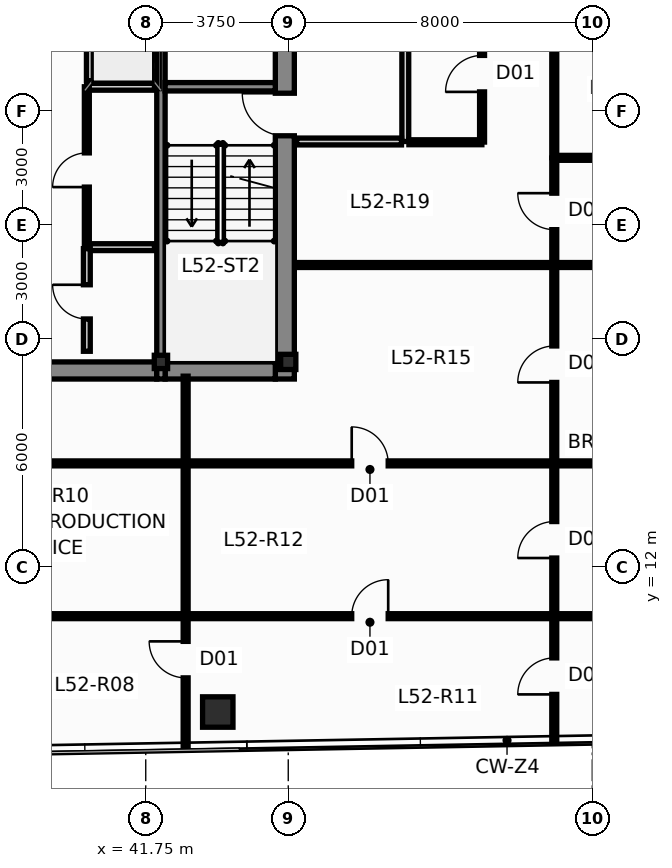
"""IFC4 building model, lengths in metres.
Left out: names, types, materials, properties, quantities, classifications, styles, units other than length and angle.
Written with IfcOpenShell. Run it as: python <this file> out.ifc"""

import sys

from ifc_helpers import new_model, si_unit, direction, frame, frame_2d, origin, origin_2d, place, context, subcontext, project, spatial, rectangle, hollow_rectangle, i_section, extrude, source, transform, mapped, element, fill, save


model = new_model("IFC4")
c1 = context("Model", 3, precision=1e-05, world=origin(), true_north=direction((0.0, 1.0)))
c2 = subcontext(c1, "Body", "Model", "MODEL_VIEW")
j1 = project(units=[si_unit("LENGTHUNIT", "METRE"), si_unit("PLANEANGLEUNIT", "RADIAN")], contexts=[c1])
p1 = place(None, origin())
s1 = spatial("IfcSite", under=j1, at=p1, CompositionType="ELEMENT")
p2 = place(p1, origin())
s2 = spatial("IfcBuilding", under=s1, at=p2, CompositionType="ELEMENT")
p3 = place(p2, frame((0.0, 0.0, 198.65)))
s3 = spatial("IfcBuildingStorey", under=s2, at=p3, CompositionType="ELEMENT", Elevation=198.65)
m1 = source(origin(), c2, "Body", "SweptSolid", [
    extrude(i_section(OverallWidth=0.4, OverallDepth=0.4, WebThickness=0.02, FlangeThickness=0.032, at=origin_2d()), origin(), (0.0, 0.0, 1.0), 3.65),
])
p4 = place(p3, frame((45.5, 17.4, 0.0), z_axis=(0.0, 0.0, 1.0), x_axis=(1.0, 0.0, 0.0)))
e1 = element("IfcColumn", 1, at=p4, inside=s3, PredefinedType="COLUMN", context=c2, shape_type="MappedRepresentation", body=[
    mapped(m1, transform((0.0, 0.0, 0.0), scale=1.0)),
])
m2 = source(origin(), c2, "Body", "SweptSolid", [
    extrude(hollow_rectangle(XDim=0.35, YDim=0.35, WallThickness=0.016, at=origin_2d()), origin(), (0.0, 0.0, 1.0), 3.65),
])
p5 = place(p3, frame((42.15, 17.4, 0.0), z_axis=(0.0, 0.0, 1.0), x_axis=(1.0, 0.0, 0.0)))
e2 = element("IfcColumn", 2, at=p5, inside=s3, PredefinedType="COLUMN", context=c2, shape_type="MappedRepresentation", body=[
    mapped(m2, transform((0.0, 0.0, 0.0), scale=1.0)),
])
p6 = place(p3, frame((45.41, 16.95, 0.0), z_axis=(0.0, 0.0, 1.0), x_axis=(0.0, 1.0, 0.0)))
e3 = element("IfcWall", 3, at=p6, inside=s3, PredefinedType="SHEAR", context=c2, shape_type="SweptSolid", body=[
    extrude(rectangle(XDim=13.275, YDim=0.5, at=frame_2d((6.638, 0.0))), origin(), (0.0, 0.0, 1.0), 3.65),
])
p7 = place(p6, frame((6.4, 0.0, 0.0)))
e4 = element("IfcOpeningElement", 4, at=p7, cuts=e3, PredefinedType="OPENING", context=c2, shape_type="SweptSolid", body=[
    extrude(rectangle(XDim=1.12, YDim=2.15, at=frame_2d((0.56, 1.075))), frame((0.0, 0.262, 0.0), z_axis=(0.0, -1.0, 0.0), x_axis=(1.0, 0.0, 0.0)), (0.0, 0.0, 1.0), 0.524),
])
p8 = place(p6, frame((10.85, 0.0, 0.0)))
e5 = element("IfcOpeningElement", 5, at=p8, cuts=e3, PredefinedType="OPENING", context=c2, shape_type="SweptSolid", body=[
    extrude(rectangle(XDim=1.2, YDim=2.2, at=frame_2d((0.6, 1.1))), frame((0.0, 0.262, 0.0), z_axis=(0.0, -1.0, 0.0), x_axis=(1.0, 0.0, 0.0)), (0.0, 0.0, 1.0), 0.524),
])
p9 = place(p3, frame((33.96, 17.175, 0.0), z_axis=(0.0, 0.0, 1.0), x_axis=(1.0, 0.0, 0.0)))
e6 = element("IfcWall", 6, at=p9, inside=s3, PredefinedType="SHEAR", context=c2, shape_type="SweptSolid", body=[
    extrude(rectangle(XDim=8.08, YDim=0.45, at=frame_2d((4.04, 0.0))), origin(), (0.0, 0.0, 1.0), 3.65),
])
p10 = place(p3, frame((42.26, 17.175, 0.0), z_axis=(0.0, 0.0, 1.0), x_axis=(1.0, 0.0, 0.0)))
e7 = element("IfcWall", 7, at=p10, inside=s3, PredefinedType="SHEAR", context=c2, shape_type="SweptSolid", body=[
    extrude(rectangle(XDim=2.9, YDim=0.45, at=frame_2d((1.45, 0.0))), origin(), (0.0, 0.0, 1.0), 3.65),
])
p11 = place(p3, frame((42.15, 16.95, 0.0), z_axis=(0.0, 0.0, 1.0), x_axis=(0.0, 1.0, 0.0)))
e8 = element("IfcWall", 8, at=p11, inside=s3, PredefinedType="SHEAR", context=c2, shape_type="SweptSolid", body=[
    extrude(rectangle(XDim=13.275, YDim=0.22, at=frame_2d((6.638, 0.0))), origin(), (0.0, 0.0, 1.0), 3.65),
])
p12 = place(p3, frame((42.26, 24.64, 0.0), z_axis=(0.0, 0.0, 1.0), x_axis=(1.0, 0.0, 0.0)))
e9 = element("IfcWall", 9, at=p12, inside=s3, PredefinedType="SHEAR", context=c2, shape_type="SweptSolid", body=[
    extrude(rectangle(XDim=2.9, YDim=0.22, at=frame_2d((1.45, 0.0))), origin(), (0.0, 0.0, 1.0), 3.65),
])
m3 = source(origin(), c2, "Body", "SweptSolid", [
    extrude(hollow_rectangle(XDim=0.8, YDim=0.8, WallThickness=0.045, at=origin_2d()), origin(), (0.0, 0.0, 1.0), 3.651),
])
p13 = place(p3, frame((43.646, 8.188, 0.0), z_axis=(0.004413512568, 0.019793935152, 0.999794339371), x_axis=(-0.976031638482, 0.217628676148, 0.0)))
e10 = element("IfcColumn", 10, at=p13, inside=s3, PredefinedType="COLUMN", context=c2, shape_type="MappedRepresentation", body=[
    mapped(m3, transform((0.0, 0.0, 0.0), scale=1.0)),
])
p14 = place(p3, frame((40.28, 24.8, 0.0), z_axis=(0.0, 0.0, 1.0), x_axis=(0.0, 1.0, 0.0)))
e11 = element("IfcWall", 11, at=p14, inside=s3, PredefinedType="PARTITIONING", context=c2, shape_type="SweptSolid", body=[
    extrude(rectangle(XDim=2.0, YDim=0.18, at=frame_2d((1.0, 0.0))), origin(), (0.0, 0.0, 1.0), 3.4),
])
p15 = place(p3, frame((40.2, 24.64, 0.0), z_axis=(0.0, 0.0, 1.0), x_axis=(1.0, 0.0, 0.0)))
e12 = element("IfcWall", 12, at=p15, inside=s3, PredefinedType="PARTITIONING", context=c2, shape_type="SweptSolid", body=[
    extrude(rectangle(XDim=1.78, YDim=0.18, at=frame_2d((0.89, 0.0))), origin(), (0.0, 0.0, 1.0), 3.4),
])
p16 = place(p3, frame((48.58, 23.2, 0.0), z_axis=(0.0, 0.0, 1.0), x_axis=(0.0, 1.0, 0.0)))
e13 = element("IfcWall", 13, at=p16, inside=s3, PredefinedType="PARTITIONING", context=c2, shape_type="SweptSolid", body=[
    extrude(rectangle(XDim=6.4, YDim=0.18, at=frame_2d((3.2, 0.0))), origin(), (0.0, 0.0, 1.0), 3.078),
])
p17 = place(p16, frame((2.65, 0.0, 0.0)))
e14 = element("IfcOpeningElement", 14, at=p17, cuts=e13, PredefinedType="OPENING", context=c2, shape_type="SweptSolid", body=[
    extrude(rectangle(XDim=1.05, YDim=2.15, at=frame_2d((0.525, 1.075))), frame((0.0, 0.102, 0.0), z_axis=(0.0, -1.0, 0.0), x_axis=(1.0, 0.0, 0.0)), (0.0, 0.0, 1.0), 0.204),
])
p18 = place(p3, frame((45.72, 23.2, 0.0), z_axis=(0.0, 0.0, 1.0), x_axis=(1.0, 0.0, 0.0)))
e15 = element("IfcWall", 15, at=p18, inside=s3, PredefinedType="PARTITIONING", context=c2, shape_type="SweptSolid", body=[
    extrude(rectangle(XDim=2.76, YDim=0.18, at=frame_2d((1.38, 0.0))), origin(), (0.0, 0.0, 1.0), 3.4),
])
p19 = place(p3, frame((40.22, 20.42, 0.0), z_axis=(0.0, 0.0, 1.0), x_axis=(1.0, 0.0, 0.0)))
e16 = element("IfcWall", 16, at=p19, inside=s3, PredefinedType="PARTITIONING", context=c2, shape_type="SweptSolid", body=[
    extrude(rectangle(XDim=1.76, YDim=0.18, at=frame_2d((0.88, 0.0))), origin(), (0.0, 0.0, 1.0), 3.4),
])
p20 = place(p3, frame((40.2, 20.5, 0.0), z_axis=(0.0, 0.0, 1.0), x_axis=(0.0, 1.0, 0.0)))
e17 = element("IfcWall", 17, at=p20, inside=s3, PredefinedType="PARTITIONING", context=c2, shape_type="SweptSolid", body=[
    extrude(rectangle(XDim=4.14, YDim=0.13, at=frame_2d((2.07, 0.0))), origin(), (0.0, 0.0, 1.0), 3.4),
])
p21 = place(p20, frame((1.5, 0.0, 0.0)))
e18 = element("IfcOpeningElement", 18, at=p21, cuts=e17, PredefinedType="OPENING", context=c2, shape_type="SweptSolid", body=[
    extrude(rectangle(XDim=0.9, YDim=2.1, at=frame_2d((0.45, 1.05))), frame((0.0, 0.077, 0.0), z_axis=(0.0, -1.0, 0.0), x_axis=(1.0, 0.0, 0.0)), (0.0, 0.0, 1.0), 0.154),
])
p22 = place(p3, frame((40.2, 17.68, 0.0), z_axis=(0.0, 0.0, 1.0), x_axis=(0.0, 1.0, 0.0)))
e19 = element("IfcWall", 19, at=p22, inside=s3, PredefinedType="PARTITIONING", context=c2, shape_type="SweptSolid", body=[
    extrude(rectangle(XDim=2.7, YDim=0.18, at=frame_2d((1.35, 0.0))), origin(), (0.0, 0.0, 1.0), 3.4),
])
p23 = place(p22, frame((0.85, 0.0, 0.0)))
e20 = element("IfcOpeningElement", 20, at=p23, cuts=e19, PredefinedType="OPENING", context=c2, shape_type="SweptSolid", body=[
    extrude(rectangle(XDim=0.9, YDim=2.1, at=frame_2d((0.45, 1.05))), frame((0.0, 0.102, 0.0), z_axis=(0.0, -1.0, 0.0), x_axis=(1.0, 0.0, 0.0)), (0.0, 0.0, 1.0), 0.204),
])
p24 = place(p3, frame((52.505, 14.73, 0.0), z_axis=(0.0, 0.0, 1.0), x_axis=(1.0, 0.0, 0.0)))
e21 = element("IfcWall", 21, at=p24, inside=s3, PredefinedType="PARTITIONING", context=c2, shape_type="SweptSolid", body=[
    extrude(rectangle(XDim=9.759, YDim=0.13, at=frame_2d((4.879, 0.0))), origin(), (0.0, 0.0, 1.0), 3.4),
])
p25 = place(p3, frame((42.805, 10.71, 0.0), z_axis=(0.0, 0.0, 1.0), x_axis=(1.0, 0.0, 0.0)))
e22 = element("IfcWall", 22, at=p25, inside=s3, PredefinedType="PARTITIONING", context=c2, shape_type="SweptSolid", body=[
    extrude(rectangle(XDim=9.69, YDim=0.13, at=frame_2d((4.845, 0.0))), origin(), (0.0, 0.0, 1.0), 3.4),
])
p26 = place(p25, frame((4.365, 0.0, 0.0)))
e23 = element("IfcOpeningElement", 23, at=p26, cuts=e22, PredefinedType="OPENING", context=c2, shape_type="SweptSolid", body=[
    extrude(rectangle(XDim=0.96, YDim=2.15, at=frame_2d((0.48, 1.075))), frame((0.0, 0.077, 0.0), z_axis=(0.0, -1.0, 0.0), x_axis=(1.0, 0.0, 0.0)), (0.0, 0.0, 1.0), 0.154),
])
p27 = place(p3, frame((42.805, 14.73, 0.0), z_axis=(0.0, 0.0, 1.0), x_axis=(1.0, 0.0, 0.0)))
e24 = element("IfcWall", 24, at=p27, inside=s3, PredefinedType="PARTITIONING", context=c2, shape_type="SweptSolid", body=[
    extrude(rectangle(XDim=9.69, YDim=0.13, at=frame_2d((4.845, 0.0))), origin(), (0.0, 0.0, 1.0), 3.078),
])
p28 = place(p27, frame((4.365, 0.0, 0.0)))
e25 = element("IfcOpeningElement", 25, at=p28, cuts=e24, PredefinedType="OPENING", context=c2, shape_type="SweptSolid", body=[
    extrude(rectangle(XDim=0.96, YDim=2.15, at=frame_2d((0.48, 1.075))), frame((0.0, 0.077, 0.0), z_axis=(0.0, -1.0, 0.0), x_axis=(1.0, 0.0, 0.0)), (0.0, 0.0, 1.0), 0.154),
])
p29 = place(p3, frame((33.205, 10.71, 0.0), z_axis=(0.0, 0.0, 1.0), x_axis=(1.0, 0.0, 0.0)))
e26 = element("IfcWall", 26, at=p29, inside=s3, PredefinedType="PARTITIONING", context=c2, shape_type="SweptSolid", body=[
    extrude(rectangle(XDim=9.59, YDim=0.13, at=frame_2d((4.795, 0.0))), origin(), (0.0, 0.0, 1.0), 3.4),
])
p30 = place(p29, frame((4.315, 0.0, 0.0)))
e27 = element("IfcOpeningElement", 27, at=p30, cuts=e26, PredefinedType="OPENING", context=c2, shape_type="SweptSolid", body=[
    extrude(rectangle(XDim=0.96, YDim=2.15, at=frame_2d((0.48, 1.075))), frame((0.0, 0.077, 0.0), z_axis=(0.0, -1.0, 0.0), x_axis=(1.0, 0.0, 0.0)), (0.0, 0.0, 1.0), 0.154),
])
p31 = place(p3, frame((33.205, 14.73, 0.0), z_axis=(0.0, 0.0, 1.0), x_axis=(1.0, 0.0, 0.0)))
e28 = element("IfcWall", 28, at=p31, inside=s3, PredefinedType="PARTITIONING", context=c2, shape_type="SweptSolid", body=[
    extrude(rectangle(XDim=9.59, YDim=0.13, at=frame_2d((4.795, 0.0))), origin(), (0.0, 0.0, 1.0), 3.078),
])
p32 = place(p3, frame((52.505, 10.71, 0.0), z_axis=(0.0, 0.0, 1.0), x_axis=(1.0, 0.0, 0.0)))
e29 = element("IfcWall", 29, at=p32, inside=s3, PredefinedType="PARTITIONING", context=c2, shape_type="SweptSolid", body=[
    extrude(rectangle(XDim=7.447, YDim=0.13, at=frame_2d((3.723, 0.0))), origin(), (0.0, 0.0, 1.0), 3.4),
])
p33 = place(p3, frame((52.505, 19.95, 0.0), z_axis=(0.0, 0.0, 1.0), x_axis=(1.0, 0.0, 0.0)))
e30 = element("IfcWall", 30, at=p33, inside=s3, PredefinedType="PARTITIONING", context=c2, shape_type="SweptSolid", body=[
    extrude(rectangle(XDim=6.817, YDim=0.13, at=frame_2d((3.409, 0.0))), origin(), (0.0, 0.0, 1.0), 3.4),
])
p34 = place(p3, frame((45.675, 19.95, 0.0), z_axis=(0.0, 0.0, 1.0), x_axis=(1.0, 0.0, 0.0)))
e31 = element("IfcWall", 31, at=p34, inside=s3, PredefinedType="PARTITIONING", context=c2, shape_type="SweptSolid", body=[
    extrude(rectangle(XDim=6.82, YDim=0.13, at=frame_2d((3.41, 0.0))), origin(), (0.0, 0.0, 1.0), 3.4),
])
p35 = place(p3, frame((52.505, 22.77, 0.0), z_axis=(0.0, 0.0, 1.0), x_axis=(1.0, 0.0, 0.0)))
e32 = element("IfcWall", 32, at=p35, inside=s3, PredefinedType="PARTITIONING", context=c2, shape_type="SweptSolid", body=[
    extrude(rectangle(XDim=5.228, YDim=0.13, at=frame_2d((2.614, 0.0))), origin(), (0.0, 0.0, 1.0), 3.4),
])
p36 = place(p3, frame((52.5, 14.735, 0.0), z_axis=(0.0, 0.0, 1.0), x_axis=(0.0, 1.0, 0.0)))
e33 = element("IfcWall", 33, at=p36, inside=s3, PredefinedType="PARTITIONING", context=c2, shape_type="SweptSolid", body=[
    extrude(rectangle(XDim=5.21, YDim=0.13, at=frame_2d((2.605, 0.0))), origin(), (0.0, 0.0, 1.0), 3.078),
])
p37 = place(p36, frame((2.125, 0.0, 0.0)))
e34 = element("IfcOpeningElement", 34, at=p37, cuts=e33, PredefinedType="OPENING", context=c2, shape_type="SweptSolid", body=[
    extrude(rectangle(XDim=0.96, YDim=2.15, at=frame_2d((0.48, 1.075))), frame((0.0, 0.077, 0.0), z_axis=(0.0, -1.0, 0.0), x_axis=(1.0, 0.0, 0.0)), (0.0, 0.0, 1.0), 0.154),
])
p38 = place(p3, frame((42.8, 10.715, 0.0), z_axis=(0.0, 0.0, 1.0), x_axis=(0.0, 1.0, 0.0)))
e35 = element("IfcWall", 35, at=p38, inside=s3, PredefinedType="PARTITIONING", context=c2, shape_type="SweptSolid", body=[
    extrude(rectangle(XDim=4.01, YDim=0.13, at=frame_2d((2.005, 0.0))), origin(), (0.0, 0.0, 1.0), 3.4),
])
p39 = place(p3, frame((52.5, 10.715, 0.0), z_axis=(0.0, 0.0, 1.0), x_axis=(0.0, 1.0, 0.0)))
e36 = element("IfcWall", 36, at=p39, inside=s3, PredefinedType="PARTITIONING", context=c2, shape_type="SweptSolid", body=[
    extrude(rectangle(XDim=4.01, YDim=0.13, at=frame_2d((2.005, 0.0))), origin(), (0.0, 0.0, 1.0), 3.4),
])
p40 = place(p39, frame((1.525, 0.0, 0.0)))
e37 = element("IfcOpeningElement", 37, at=p40, cuts=e36, PredefinedType="OPENING", context=c2, shape_type="SweptSolid", body=[
    extrude(rectangle(XDim=0.96, YDim=2.15, at=frame_2d((0.48, 1.075))), frame((0.0, 0.077, 0.0), z_axis=(0.0, -1.0, 0.0), x_axis=(1.0, 0.0, 0.0)), (0.0, 0.0, 1.0), 0.154),
])
p41 = place(p3, frame((52.5, 22.775, 0.0), z_axis=(0.0, 0.0, 1.0), x_axis=(0.0, 1.0, 0.0)))
e38 = element("IfcWall", 38, at=p41, inside=s3, PredefinedType="PARTITIONING", context=c2, shape_type="SweptSolid", body=[
    extrude(rectangle(XDim=4.01, YDim=0.13, at=frame_2d((2.005, 0.0))), origin(), (0.0, 0.0, 1.0), 3.078),
])
p42 = place(p3, frame((50.6, 23.185, 0.0), z_axis=(0.0, 0.0, 1.0), x_axis=(0.0, 1.0, 0.0)))
e39 = element("IfcWall", 39, at=p42, inside=s3, PredefinedType="PARTITIONING", context=c2, shape_type="SweptSolid", body=[
    extrude(rectangle(XDim=3.6, YDim=0.13, at=frame_2d((1.8, 0.0))), origin(), (0.0, 0.0, 1.0), 3.078),
])
p43 = place(p42, frame((1.32, 0.0, 0.0)))
e40 = element("IfcOpeningElement", 40, at=p43, cuts=e39, PredefinedType="OPENING", context=c2, shape_type="SweptSolid", body=[
    extrude(rectangle(XDim=0.96, YDim=2.15, at=frame_2d((0.48, 1.075))), frame((0.0, 0.077, 0.0), z_axis=(0.0, -1.0, 0.0), x_axis=(1.0, 0.0, 0.0)), (0.0, 0.0, 1.0), 0.154),
])
p44 = place(p3, frame((42.8, 7.287, 0.0), z_axis=(0.0, 0.0, 1.0), x_axis=(0.0, 1.0, 0.0)))
e41 = element("IfcWall", 41, at=p44, inside=s3, PredefinedType="PARTITIONING", context=c2, shape_type="SweptSolid", body=[
    extrude(rectangle(XDim=3.418, YDim=0.13, at=frame_2d((1.709, 0.0))), origin(), (0.0, 0.0, 1.0), 3.4),
])
p45 = place(p44, frame((1.8, 0.0, 0.0)))
e42 = element("IfcOpeningElement", 42, at=p45, cuts=e41, PredefinedType="OPENING", context=c2, shape_type="SweptSolid", body=[
    extrude(rectangle(XDim=0.96, YDim=2.15, at=frame_2d((0.48, 1.075))), frame((0.0, 0.077, 0.0), z_axis=(0.0, -1.0, 0.0), x_axis=(1.0, 0.0, 0.0)), (0.0, 0.0, 1.0), 0.154),
])
p46 = place(p3, frame((52.5, 7.46, 0.0), z_axis=(0.0, 0.0, 1.0), x_axis=(0.0, 1.0, 0.0)))
e43 = element("IfcWall", 43, at=p46, inside=s3, PredefinedType="PARTITIONING", context=c2, shape_type="SweptSolid", body=[
    extrude(rectangle(XDim=3.245, YDim=0.13, at=frame_2d((1.623, 0.0))), origin(), (0.0, 0.0, 1.0), 3.4),
])
p47 = place(p46, frame((1.192, 0.0, 0.0)))
e44 = element("IfcOpeningElement", 44, at=p47, cuts=e43, PredefinedType="OPENING", context=c2, shape_type="SweptSolid", body=[
    extrude(rectangle(XDim=0.96, YDim=2.15, at=frame_2d((0.48, 1.075))), frame((0.0, 0.077, 0.0), z_axis=(0.0, -1.0, 0.0), x_axis=(1.0, 0.0, 0.0)), (0.0, 0.0, 1.0), 0.154),
])
p48 = place(p3, frame((52.5, 19.955, 0.0), z_axis=(0.0, 0.0, 1.0), x_axis=(0.0, 1.0, 0.0)))
e45 = element("IfcWall", 45, at=p48, inside=s3, PredefinedType="PARTITIONING", context=c2, shape_type="SweptSolid", body=[
    extrude(rectangle(XDim=2.81, YDim=0.13, at=frame_2d((1.405, 0.0))), origin(), (0.0, 0.0, 1.0), 3.078),
])
p49 = place(p48, frame((0.925, 0.0, 0.0)))
e46 = element("IfcOpeningElement", 46, at=p49, cuts=e45, PredefinedType="OPENING", context=c2, shape_type="SweptSolid", body=[
    extrude(rectangle(XDim=0.96, YDim=2.15, at=frame_2d((0.48, 1.075))), frame((0.0, 0.077, 0.0), z_axis=(0.0, -1.0, 0.0), x_axis=(1.0, 0.0, 0.0)), (0.0, 0.0, 1.0), 0.154),
])
p50 = place(p3, frame((42.8, 14.735, 0.0), z_axis=(0.0, 0.0, 1.0), x_axis=(0.0, 1.0, 0.0)))
e47 = element("IfcWall", 47, at=p50, inside=s3, PredefinedType="PARTITIONING", context=c2, shape_type="SweptSolid", body=[
    extrude(rectangle(XDim=2.29, YDim=0.13, at=frame_2d((1.145, 0.0))), origin(), (0.0, 0.0, 1.0), 3.4),
])
p51 = place(p3, frame((48.675, 23.18, 0.0), z_axis=(0.0, 0.0, 1.0), x_axis=(1.0, 0.0, 0.0)))
e48 = element("IfcWall", 48, at=p51, inside=s3, PredefinedType="PARTITIONING", context=c2, shape_type="SweptSolid", body=[
    extrude(rectangle(XDim=1.92, YDim=0.13, at=frame_2d((0.96, 0.0))), origin(), (0.0, 0.0, 1.0), 3.4),
])
p52 = place(p7, origin())
e49 = element("IfcDoor", 49, at=p52, inside=s3, OperationType="SINGLE_SWING_RIGHT", PredefinedType="DOOR", context=c2, shape_type="SweptSolid", body=[
    extrude(rectangle(XDim=1.12, YDim=2.15, at=frame_2d((0.56, 1.075))), frame((0.0, 0.025, 0.0), z_axis=(0.0, -1.0, 0.0), x_axis=(1.0, 0.0, 0.0)), (0.0, 0.0, 1.0), 0.05),
])
fill(e4, e49)
p53 = place(p21, origin())
e50 = element("IfcDoor", 50, at=p53, inside=s3, OperationType="SINGLE_SWING_LEFT", PredefinedType="DOOR", context=c2, shape_type="SweptSolid", body=[
    extrude(rectangle(XDim=0.9, YDim=2.1, at=frame_2d((0.45, 1.05))), frame((0.0, 0.025, 0.0), z_axis=(0.0, -1.0, 0.0), x_axis=(1.0, 0.0, 0.0)), (0.0, 0.0, 1.0), 0.05),
])
fill(e18, e50)
p54 = place(p23, origin())
e51 = element("IfcDoor", 51, at=p54, inside=s3, OperationType="SINGLE_SWING_RIGHT", PredefinedType="DOOR", context=c2, shape_type="SweptSolid", body=[
    extrude(rectangle(XDim=0.9, YDim=2.1, at=frame_2d((0.45, 1.05))), frame((0.0, 0.025, 0.0), z_axis=(0.0, -1.0, 0.0), x_axis=(1.0, 0.0, 0.0)), (0.0, 0.0, 1.0), 0.05),
])
fill(e20, e51)
p55 = place(p26, origin())
e52 = element("IfcDoor", 52, at=p55, inside=s3, OperationType="SINGLE_SWING_RIGHT", PredefinedType="DOOR", context=c2, shape_type="SweptSolid", body=[
    extrude(rectangle(XDim=0.96, YDim=2.15, at=frame_2d((0.48, 1.075))), frame((0.0, 0.025, 0.0), z_axis=(0.0, -1.0, 0.0), x_axis=(1.0, 0.0, 0.0)), (0.0, 0.0, 1.0), 0.05),
])
fill(e23, e52)
p56 = place(p28, origin())
e53 = element("IfcDoor", 53, at=p56, inside=s3, OperationType="SINGLE_SWING_LEFT", PredefinedType="DOOR", context=c2, shape_type="SweptSolid", body=[
    extrude(rectangle(XDim=0.96, YDim=2.15, at=frame_2d((0.48, 1.075))), frame((0.0, 0.025, 0.0), z_axis=(0.0, -1.0, 0.0), x_axis=(1.0, 0.0, 0.0)), (0.0, 0.0, 1.0), 0.05),
])
fill(e25, e53)
p57 = place(p37, origin())
e54 = element("IfcDoor", 54, at=p57, inside=s3, OperationType="SINGLE_SWING_LEFT", PredefinedType="DOOR", context=c2, shape_type="SweptSolid", body=[
    extrude(rectangle(XDim=0.96, YDim=2.15, at=frame_2d((0.48, 1.075))), frame((0.0, 0.025, 0.0), z_axis=(0.0, -1.0, 0.0), x_axis=(1.0, 0.0, 0.0)), (0.0, 0.0, 1.0), 0.05),
])
fill(e34, e54)
p58 = place(p40, origin())
e55 = element("IfcDoor", 55, at=p58, inside=s3, OperationType="SINGLE_SWING_LEFT", PredefinedType="DOOR", context=c2, shape_type="SweptSolid", body=[
    extrude(rectangle(XDim=0.96, YDim=2.15, at=frame_2d((0.48, 1.075))), frame((0.0, 0.025, 0.0), z_axis=(0.0, -1.0, 0.0), x_axis=(1.0, 0.0, 0.0)), (0.0, 0.0, 1.0), 0.05),
])
fill(e37, e55)
p59 = place(p43, origin())
e56 = element("IfcDoor", 56, at=p59, inside=s3, OperationType="SINGLE_SWING_LEFT", PredefinedType="DOOR", context=c2, shape_type="SweptSolid", body=[
    extrude(rectangle(XDim=0.96, YDim=2.15, at=frame_2d((0.48, 1.075))), frame((0.0, 0.025, 0.0), z_axis=(0.0, -1.0, 0.0), x_axis=(1.0, 0.0, 0.0)), (0.0, 0.0, 1.0), 0.05),
])
fill(e40, e56)
p60 = place(p45, origin())
e57 = element("IfcDoor", 57, at=p60, inside=s3, OperationType="SINGLE_SWING_RIGHT", PredefinedType="DOOR", context=c2, shape_type="SweptSolid", body=[
    extrude(rectangle(XDim=0.96, YDim=2.15, at=frame_2d((0.48, 1.075))), frame((0.0, 0.025, 0.0), z_axis=(0.0, -1.0, 0.0), x_axis=(1.0, 0.0, 0.0)), (0.0, 0.0, 1.0), 0.05),
])
fill(e42, e57)
p61 = place(p47, origin())
e58 = element("IfcDoor", 58, at=p61, inside=s3, OperationType="SINGLE_SWING_LEFT", PredefinedType="DOOR", context=c2, shape_type="SweptSolid", body=[
    extrude(rectangle(XDim=0.96, YDim=2.15, at=frame_2d((0.48, 1.075))), frame((0.0, 0.025, 0.0), z_axis=(0.0, -1.0, 0.0), x_axis=(1.0, 0.0, 0.0)), (0.0, 0.0, 1.0), 0.05),
])
fill(e44, e58)
p62 = place(p49, origin())
e59 = element("IfcDoor", 59, at=p62, inside=s3, OperationType="SINGLE_SWING_RIGHT", PredefinedType="DOOR", context=c2, shape_type="SweptSolid", body=[
    extrude(rectangle(XDim=0.96, YDim=2.15, at=frame_2d((0.48, 1.075))), frame((0.0, 0.025, 0.0), z_axis=(0.0, -1.0, 0.0), x_axis=(1.0, 0.0, 0.0)), (0.0, 0.0, 1.0), 0.05),
])
fill(e46, e59)
save(model, sys.argv[1])
